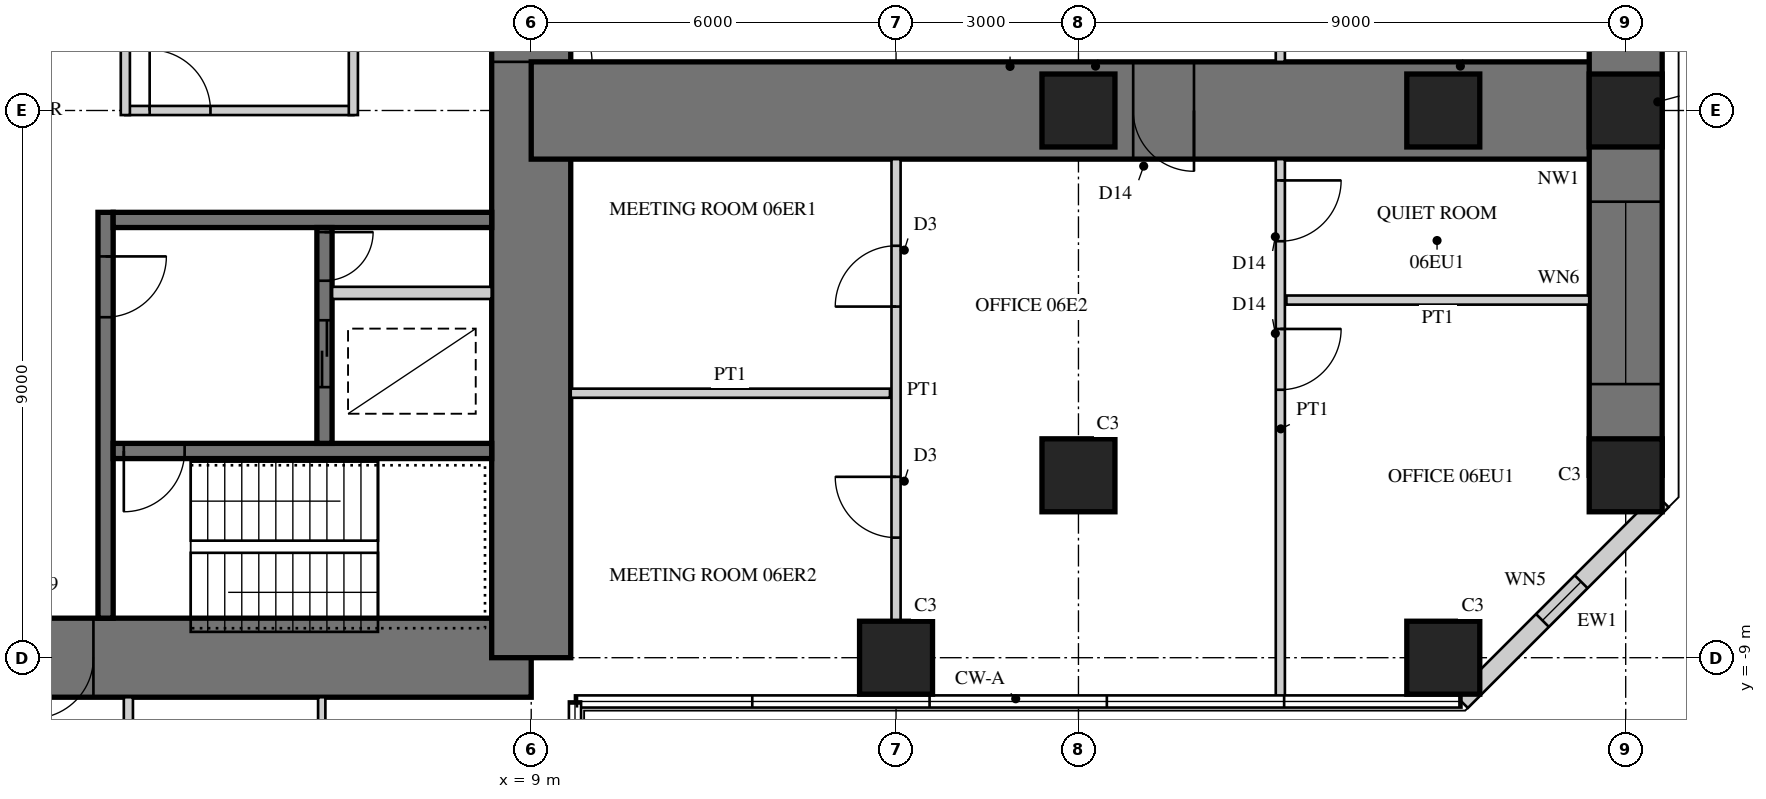
"""IFC4 building model, lengths in metres.
Left out: names, types, materials, properties, quantities, classifications, styles, units other than length and angle.
Written with IfcOpenShell. Run it as: python <this file> out.ifc"""

import sys

from ifc_helpers import new_model, si_unit, direction, frame, frame_2d, origin, origin_2d, place, context, subcontext, project, spatial, rectangle, hollow_rectangle, extrude, element, fill, save


model = new_model("IFC4")
c1 = context("Model", 3, precision=1e-05, world=origin(), true_north=direction((0.0, 1.0)))
c2 = subcontext(c1, "Body", "Model", "MODEL_VIEW")
j1 = project(units=[si_unit("LENGTHUNIT", "METRE"), si_unit("PLANEANGLEUNIT", "RADIAN")], contexts=[c1])
p1 = place(None, origin())
s1 = spatial("IfcSite", under=j1, at=p1, CompositionType="ELEMENT")
p2 = place(p1, origin())
s2 = spatial("IfcBuilding", under=s1, at=p2, CompositionType="ELEMENT")
p3 = place(p2, frame((0.0, 0.0, 27.5)))
s3 = spatial("IfcBuildingStorey", under=s2, at=p3, CompositionType="ELEMENT", Elevation=27.5)
p4 = place(p3, frame((-9.0, -9.0, 0.0), z_axis=(0.0, 0.0, 1.0), x_axis=(1.0, 0.0, 0.0)))
e1 = element("IfcWall", 1, at=p4, inside=s3, PredefinedType="SHEAR", context=c2, shape_type="SweptSolid", body=[
    extrude(rectangle(XDim=18.0, YDim=1.3, at=frame_2d((9.0, 0.0))), origin(), (0.0, 0.0, 1.0), 4.0),
])
p5 = place(p4, frame((9.8, 0.0, 0.0)))
e2 = element("IfcOpeningElement", 2, at=p5, cuts=e1, PredefinedType="OPENING", context=c2, shape_type="SweptSolid", body=[
    extrude(rectangle(XDim=1.0, YDim=2.4, at=frame_2d((0.5, 1.2))), frame((0.0, 0.66, 0.0), z_axis=(0.0, -1.0, 0.0), x_axis=(1.0, 0.0, 0.0)), (0.0, 0.0, 1.0), 1.32),
])
p6 = place(p3, frame((9.0, -9.0, 0.0), z_axis=(0.0, 0.0, 1.0), x_axis=(0.0, 1.0, 0.0)))
e3 = element("IfcWall", 3, at=p6, inside=s3, PredefinedType="SHEAR", context=c2, shape_type="SweptSolid", body=[
    extrude(rectangle(XDim=18.0, YDim=1.3, at=frame_2d((9.0, 0.0))), origin(), (0.0, 0.0, 1.0), 4.0),
])
p7 = place(p6, frame((9.8, 0.0, 0.0)))
e4 = element("IfcOpeningElement", 4, at=p7, cuts=e3, PredefinedType="OPENING", context=c2, shape_type="SweptSolid", body=[
    extrude(rectangle(XDim=1.0, YDim=2.4, at=frame_2d((0.5, 1.2))), frame((0.0, 0.66, 0.0), z_axis=(0.0, -1.0, 0.0), x_axis=(1.0, 0.0, 0.0)), (0.0, 0.0, 1.0), 1.32),
])
p8 = place(p3, frame((2.0, -1.675, 0.0), z_axis=(0.0, 0.0, 1.0), x_axis=(0.0, -1.0, 0.0)))
e5 = element("IfcWall", 5, at=p8, inside=s3, PredefinedType="SHEAR", context=c2, shape_type="SweptSolid", body=[
    extrude(rectangle(XDim=6.675, YDim=0.25, at=frame_2d((3.337, 0.0))), origin(), (0.0, 0.0, 1.0), 4.0),
])
p9 = place(p8, frame((0.725, 0.0, 0.0)))
e6 = element("IfcOpeningElement", 6, at=p9, cuts=e5, PredefinedType="OPENING", context=c2, shape_type="SweptSolid", body=[
    extrude(rectangle(XDim=1.0, YDim=2.1, at=frame_2d((0.5, 1.05))), frame((0.0, 0.135, 0.0), z_axis=(0.0, -1.0, 0.0), x_axis=(1.0, 0.0, 0.0)), (0.0, 0.0, 1.0), 0.27),
])
p10 = place(p3, frame((2.125, -1.8, 0.0), z_axis=(0.0, 0.0, 1.0), x_axis=(1.0, 0.0, 0.0)))
e7 = element("IfcWall", 7, at=p10, inside=s3, PredefinedType="SHEAR", context=c2, shape_type="SweptSolid", body=[
    extrude(rectangle(XDim=6.225, YDim=0.25, at=frame_2d((3.113, 0.0))), origin(), (0.0, 0.0, 1.0), 4.0),
])
p11 = place(p3, frame((2.125, -5.6, 0.0), z_axis=(0.0, 0.0, 1.0), x_axis=(1.0, 0.0, 0.0)))
e8 = element("IfcWall", 8, at=p11, inside=s3, PredefinedType="SHEAR", context=c2, shape_type="SweptSolid", body=[
    extrude(rectangle(XDim=6.225, YDim=0.25, at=frame_2d((3.113, 0.0))), origin(), (0.0, 0.0, 1.0), 4.0),
])
p12 = place(p11, frame((0.175, 0.0, 0.0)))
e9 = element("IfcOpeningElement", 9, at=p12, cuts=e8, PredefinedType="OPENING", context=c2, shape_type="SweptSolid", body=[
    extrude(rectangle(XDim=1.0, YDim=2.1, at=frame_2d((0.5, 1.05))), frame((0.0, 0.135, 0.0), z_axis=(0.0, -1.0, 0.0), x_axis=(1.0, 0.0, 0.0)), (0.0, 0.0, 1.0), 0.27),
])
p13 = place(p3, frame((5.6, -1.925, 0.0), z_axis=(0.0, 0.0, 1.0), x_axis=(0.0, -1.0, 0.0)))
e10 = element("IfcWall", 10, at=p13, inside=s3, PredefinedType="SHEAR", context=c2, shape_type="SweptSolid", body=[
    extrude(rectangle(XDim=3.55, YDim=0.25, at=frame_2d((1.775, 0.0))), origin(), (0.0, 0.0, 1.0), 4.0),
])
p14 = place(p13, frame((1.525, 0.0, 0.0)))
e11 = element("IfcOpeningElement", 11, at=p14, cuts=e10, PredefinedType="OPENING", context=c2, shape_type="SweptSolid", body=[
    extrude(rectangle(XDim=1.1, YDim=2.2, at=frame_2d((0.55, 1.1))), frame((0.0, 0.135, 0.0), z_axis=(0.0, -1.0, 0.0), x_axis=(1.0, 0.0, 0.0)), (0.0, 0.0, 1.0), 0.27),
])
p15 = place(p13, frame((0.075, 0.0, 0.0)))
e12 = element("IfcOpeningElement", 12, at=p15, cuts=e10, PredefinedType="OPENING", context=c2, shape_type="SweptSolid", body=[
    extrude(rectangle(XDim=0.8, YDim=2.1, at=frame_2d((0.4, 1.05))), frame((0.0, 0.135, 0.0), z_axis=(0.0, -1.0, 0.0), x_axis=(1.0, 0.0, 0.0)), (0.0, 0.0, 1.0), 0.27),
])
p16 = place(p3, frame((5.725, -3.0, 0.0), z_axis=(0.0, 0.0, 1.0), x_axis=(1.0, 0.0, 0.0)))
e13 = element("IfcWall", 13, at=p16, inside=s3, PredefinedType="PARTITIONING", context=c2, shape_type="SweptSolid", body=[
    extrude(rectangle(XDim=2.625, YDim=0.2, at=frame_2d((1.312, 0.0))), origin(), (0.0, 0.0, 1.0), 4.0),
])
p17 = place(p3, frame((9.0, 0.0, 0.0), z_axis=(0.0, 0.0, 1.0), x_axis=(1.0, 0.0, 0.0)))
e14 = element("IfcWall", 14, at=p17, inside=s3, PredefinedType="SHEAR", context=c2, shape_type="SweptSolid", body=[
    extrude(rectangle(XDim=18.0, YDim=1.6, at=frame_2d((9.0, 0.0))), origin(), (0.0, 0.0, 1.0), 4.0),
])
p18 = place(p17, frame((9.9, 0.0, 0.0)))
e15 = element("IfcOpeningElement", 15, at=p18, cuts=e14, PredefinedType="OPENING", context=c2, shape_type="SweptSolid", body=[
    extrude(rectangle(XDim=1.0, YDim=2.2, at=frame_2d((0.5, 1.1))), frame((0.0, 0.81, 0.0), z_axis=(0.0, -1.0, 0.0), x_axis=(1.0, 0.0, 0.0)), (0.0, 0.0, 1.0), 1.62),
])
p19 = place(p3, frame((27.0, -6.0, 0.0), z_axis=(0.0, 0.0, 1.0), x_axis=(0.0, 1.0, 0.0)))
e16 = element("IfcWall", 16, at=p19, inside=s3, PredefinedType="SHEAR", context=c2, shape_type="SweptSolid", body=[
    extrude(rectangle(XDim=12.0, YDim=1.2, at=frame_2d((6.0, 0.0))), origin(), (0.0, 0.0, 1.0), 4.0),
])
p20 = place(p19, frame((1.5, 0.0, 0.6)))
e17 = element("IfcOpeningElement", 17, at=p20, cuts=e16, PredefinedType="OPENING", context=c2, shape_type="SweptSolid", body=[
    extrude(rectangle(XDim=3.0, YDim=2.4, at=frame_2d((1.5, 1.2))), frame((0.0, 0.61, 0.0), z_axis=(0.0, -1.0, 0.0), x_axis=(1.0, 0.0, 0.0)), (0.0, 0.0, 1.0), 1.22),
])
p21 = place(p19, frame((7.5, 0.0, 0.6)))
e18 = element("IfcOpeningElement", 18, at=p21, cuts=e16, PredefinedType="OPENING", context=c2, shape_type="SweptSolid", body=[
    extrude(rectangle(XDim=3.0, YDim=2.4, at=frame_2d((1.5, 1.2))), frame((0.0, 0.61, 0.0), z_axis=(0.0, -1.0, 0.0), x_axis=(1.0, 0.0, 0.0)), (0.0, 0.0, 1.0), 1.22),
])
for number, where, z_axis, x_axis in (
    (19, (15.0, -9.0, 0.0), (0.0, 0.0, 1.0), (1.0, 0.0, 0.0)),
    (20, (24.0, -9.0, 0.0), (0.0, 0.0, 1.0), (1.0, 0.0, 0.0)),
    (21, (27.0, -6.0, 0.0), (0.0, 0.0, 1.0), (1.0, 0.0, 0.0)),
    (22, (27.0, 0.0, 0.0), (0.0, 0.0, 1.0), (1.0, 0.0, 0.0)),
    (23, (18.0, -6.0, 0.0), (0.0, 0.0, 1.0), (1.0, 0.0, 0.0)),
    (24, (18.0, 0.0, 0.0), (0.0, 0.0, 1.0), (1.0, 0.0, 0.0)),
    (25, (24.0, 0.0, 0.0), (0.0, 0.0, 1.0), (1.0, 0.0, 0.0)),
):
    element("IfcColumn", number, at=place(p3, frame(where, z_axis=z_axis, x_axis=x_axis)), inside=s3, PredefinedType="COLUMN", context=c2, shape_type="SweptSolid", body=[
        extrude(rectangle(XDim=1.2, YDim=1.2, at=origin_2d()), origin(), (0.0, 0.0, 1.0), 4.0),
    ])
p22 = place(p3, frame((24.298, -9.72, 0.0), z_axis=(0.0, 0.0, 1.0), x_axis=(0.707106781187, 0.707106781187, 0.0)))
e26 = element("IfcWall", 26, at=p22, inside=s3, PredefinedType="SOLIDWALL", context=c2, shape_type="SweptSolid", body=[
    extrude(rectangle(XDim=4.669, YDim=0.3, at=frame_2d((2.335, 0.0))), origin(), (0.0, 0.0, 1.0), 3.8),
])
p23 = place(p22, frame((1.885, 0.0, 0.3)))
e27 = element("IfcOpeningElement", 27, at=p23, cuts=e26, PredefinedType="OPENING", context=c2, shape_type="SweptSolid", body=[
    extrude(rectangle(XDim=0.9, YDim=2.4, at=frame_2d((0.45, 1.2))), frame((0.0, 0.16, 0.0), z_axis=(0.0, -1.0, 0.0), x_axis=(1.0, 0.0, 0.0)), (0.0, 0.0, 1.0), 0.32),
])
p24 = place(p3, frame((2.325, 0.0, 0.0), z_axis=(0.0, 0.0, 1.0), x_axis=(1.0, 0.0, 0.0)))
e28 = element("IfcWall", 28, at=p24, inside=s3, PredefinedType="PARTITIONING", context=c2, shape_type="SweptSolid", body=[
    extrude(rectangle(XDim=3.75, YDim=0.15, at=frame_2d((1.875, 0.0))), origin(), (0.0, 0.0, 1.0), 3.8),
])
p25 = place(p24, frame((0.4, 0.0, 0.0)))
e29 = element("IfcOpeningElement", 29, at=p25, cuts=e28, PredefinedType="OPENING", context=c2, shape_type="SweptSolid", body=[
    extrude(rectangle(XDim=1.0, YDim=2.1, at=frame_2d((0.5, 1.05))), frame((0.0, 0.085, 0.0), z_axis=(0.0, -1.0, 0.0), x_axis=(1.0, 0.0, 0.0)), (0.0, 0.0, 1.0), 0.17),
])
for number, where, z_axis, x_axis in (
    (30, (2.325, 1.875, 0.0), (0.0, 0.0, 1.0), (0.0, -1.0, 0.0)),
    (31, (6.075, -0.075, 0.0), (0.0, 0.0, 1.0), (0.0, 1.0, 0.0)),
):
    element("IfcWall", number, at=place(p3, frame(where, z_axis=z_axis, x_axis=x_axis)), inside=s3, PredefinedType="PARTITIONING", context=c2, shape_type="SweptSolid", body=[
        extrude(rectangle(XDim=1.95, YDim=0.15, at=frame_2d((0.975, 0.0))), origin(), (0.0, 0.0, 1.0), 3.8),
    ])
p26 = place(p3, frame((15.0, -8.4, 0.0), z_axis=(0.0, 0.0, 1.0), x_axis=(0.0, 1.0, 0.0)))
e32 = element("IfcWall", 32, at=p26, inside=s3, PredefinedType="PARTITIONING", context=c2, shape_type="SweptSolid", body=[
    extrude(rectangle(XDim=7.6, YDim=0.15, at=frame_2d((3.8, 0.0))), origin(), (0.0, 0.0, 1.0), 2.95),
])
p27 = place(p26, frame((1.375, 0.0, 0.0)))
e33 = element("IfcOpeningElement", 33, at=p27, cuts=e32, PredefinedType="OPENING", context=c2, shape_type="SweptSolid", body=[
    extrude(rectangle(XDim=1.0, YDim=2.1, at=frame_2d((0.5, 1.05))), frame((0.0, 0.085, 0.0), z_axis=(0.0, -1.0, 0.0), x_axis=(1.0, 0.0, 0.0)), (0.0, 0.0, 1.0), 0.17),
])
p28 = place(p26, frame((5.175, 0.0, 0.0)))
e34 = element("IfcOpeningElement", 34, at=p28, cuts=e32, PredefinedType="OPENING", context=c2, shape_type="SweptSolid", body=[
    extrude(rectangle(XDim=1.0, YDim=2.1, at=frame_2d((0.5, 1.05))), frame((0.0, 0.085, 0.0), z_axis=(0.0, -1.0, 0.0), x_axis=(1.0, 0.0, 0.0)), (0.0, 0.0, 1.0), 0.17),
])
p29 = place(p3, frame((9.65, -4.65, 0.0), z_axis=(0.0, 0.0, 1.0), x_axis=(1.0, 0.0, 0.0)))
e35 = element("IfcWall", 35, at=p29, inside=s3, PredefinedType="PARTITIONING", context=c2, shape_type="SweptSolid", body=[
    extrude(rectangle(XDim=5.25, YDim=0.15, at=frame_2d((2.625, 0.0))), origin(), (0.0, 0.0, 1.0), 3.8),
])
p30 = place(p3, frame((21.32, 0.8, 0.0), z_axis=(0.0, 0.0, 1.0), x_axis=(0.0, 1.0, 0.0)))
e36 = element("IfcWall", 36, at=p30, inside=s3, PredefinedType="PARTITIONING", context=c2, shape_type="SweptSolid", body=[
    extrude(rectangle(XDim=8.88, YDim=0.15, at=frame_2d((4.44, 0.0))), origin(), (0.0, 0.0, 1.0), 3.8),
])
p31 = place(p30, frame((0.45, 0.0, 0.0)))
e37 = element("IfcOpeningElement", 37, at=p31, cuts=e36, PredefinedType="OPENING", context=c2, shape_type="SweptSolid", body=[
    extrude(rectangle(XDim=1.0, YDim=2.2, at=frame_2d((0.5, 1.1))), frame((0.0, 0.085, 0.0), z_axis=(0.0, -1.0, 0.0), x_axis=(1.0, 0.0, 0.0)), (0.0, 0.0, 1.0), 0.17),
])
p32 = place(p3, frame((21.42, -3.118, 0.0), z_axis=(0.0, 0.0, 1.0), x_axis=(1.0, 0.0, 0.0)))
e38 = element("IfcWall", 38, at=p32, inside=s3, PredefinedType="PARTITIONING", context=c2, shape_type="SweptSolid", body=[
    extrude(rectangle(XDim=4.98, YDim=0.15, at=frame_2d((2.49, 0.0))), origin(), (0.0, 0.0, 1.0), 3.8),
])
p33 = place(p3, frame((21.32, -9.68, 0.0), z_axis=(0.0, 0.0, 1.0), x_axis=(0.0, 1.0, 0.0)))
e39 = element("IfcWall", 39, at=p33, inside=s3, PredefinedType="PARTITIONING", context=c2, shape_type="SweptSolid", body=[
    extrude(rectangle(XDim=8.88, YDim=0.15, at=frame_2d((4.44, 0.0))), origin(), (0.0, 0.0, 1.0), 3.8),
])
p34 = place(p33, frame((5.087, 0.0, 0.0)))
e40 = element("IfcOpeningElement", 40, at=p34, cuts=e39, PredefinedType="OPENING", context=c2, shape_type="SweptSolid", body=[
    extrude(rectangle(XDim=1.0, YDim=2.2, at=frame_2d((0.5, 1.1))), frame((0.0, 0.085, 0.0), z_axis=(0.0, -1.0, 0.0), x_axis=(1.0, 0.0, 0.0)), (0.0, 0.0, 1.0), 0.17),
])
p35 = place(p33, frame((7.53, 0.0, 0.0)))
e41 = element("IfcOpeningElement", 41, at=p35, cuts=e39, PredefinedType="OPENING", context=c2, shape_type="SweptSolid", body=[
    extrude(rectangle(XDim=1.0, YDim=2.2, at=frame_2d((0.5, 1.1))), frame((0.0, 0.085, 0.0), z_axis=(0.0, -1.0, 0.0), x_axis=(1.0, 0.0, 0.0)), (0.0, 0.0, 1.0), 0.17),
])
p36 = place(p3, frame((2.375, -9.65, 0.0), z_axis=(0.0, 0.0, 1.0), x_axis=(0.0, -1.0, 0.0)))
e42 = element("IfcWall", 42, at=p36, inside=s3, PredefinedType="PARTITIONING", context=c2, shape_type="SweptSolid", body=[
    extrude(rectangle(XDim=5.35, YDim=0.15, at=frame_2d((2.675, 0.0))), origin(), (0.0, 0.0, 1.0), 3.8),
])
p37 = place(p3, frame((5.555, -9.65, 0.0), z_axis=(0.0, 0.0, 1.0), x_axis=(0.0, -1.0, 0.0)))
e43 = element("IfcWall", 43, at=p37, inside=s3, PredefinedType="PLUMBINGWALL", context=c2, shape_type="SweptSolid", body=[
    extrude(rectangle(XDim=5.25, YDim=0.12, at=frame_2d((2.625, 0.0))), origin(), (0.0, 0.0, 1.0), 3.8),
])
p38 = place(p23, origin())
e44 = element("IfcWindow", 44, at=p38, inside=s3, PartitioningType="SINGLE_PANEL", PredefinedType="WINDOW", context=c2, shape_type="SweptSolid", body=[
    extrude(hollow_rectangle(XDim=0.9, YDim=2.4, WallThickness=0.06, at=frame_2d((0.45, 1.2))), frame((0.0, 0.03, 0.0), z_axis=(0.0, -1.0, 0.0), x_axis=(1.0, 0.0, 0.0)), (0.0, 0.0, 1.0), 0.06),
    extrude(rectangle(XDim=0.779, YDim=2.279, at=frame_2d((0.45, 1.2))), frame((0.0, 0.03, 0.0), z_axis=(0.0, -1.0, 0.0), x_axis=(1.0, 0.0, 0.0)), (0.0, 0.0, 1.0), 0.06),
])
fill(e27, e44)
p39 = place(p20, origin())
e45 = element("IfcWindow", 45, at=p39, inside=s3, PartitioningType="SINGLE_PANEL", PredefinedType="WINDOW", context=c2, shape_type="SweptSolid", body=[
    extrude(hollow_rectangle(XDim=3.0, YDim=2.4, WallThickness=0.06, at=frame_2d((1.5, 1.2))), frame((0.0, 0.03, 0.0), z_axis=(0.0, -1.0, 0.0), x_axis=(1.0, 0.0, 0.0)), (0.0, 0.0, 1.0), 0.06),
    extrude(rectangle(XDim=2.879, YDim=2.279, at=frame_2d((1.5, 1.2))), frame((0.0, 0.03, 0.0), z_axis=(0.0, -1.0, 0.0), x_axis=(1.0, 0.0, 0.0)), (0.0, 0.0, 1.0), 0.06),
])
fill(e17, e45)
p40 = place(p25, origin())
e46 = element("IfcDoor", 46, at=p40, inside=s3, OperationType="SINGLE_SWING_LEFT", PredefinedType="DOOR", context=c2, shape_type="SweptSolid", body=[
    extrude(rectangle(XDim=1.0, YDim=2.1, at=frame_2d((0.5, 1.05))), frame((0.0, 0.025, 0.0), z_axis=(0.0, -1.0, 0.0), x_axis=(1.0, 0.0, 0.0)), (0.0, 0.0, 1.0), 0.05),
])
fill(e29, e46)
p41 = place(p27, origin())
e47 = element("IfcDoor", 47, at=p41, inside=s3, OperationType="SINGLE_SWING_RIGHT", PredefinedType="DOOR", context=c2, shape_type="SweptSolid", body=[
    extrude(rectangle(XDim=1.0, YDim=2.1, at=frame_2d((0.5, 1.05))), frame((0.0, 0.025, 0.0), z_axis=(0.0, -1.0, 0.0), x_axis=(1.0, 0.0, 0.0)), (0.0, 0.0, 1.0), 0.05),
])
fill(e33, e47)
p42 = place(p28, origin())
e48 = element("IfcDoor", 48, at=p42, inside=s3, OperationType="SINGLE_SWING_LEFT", PredefinedType="DOOR", context=c2, shape_type="SweptSolid", body=[
    extrude(rectangle(XDim=1.0, YDim=2.1, at=frame_2d((0.5, 1.05))), frame((0.0, 0.025, 0.0), z_axis=(0.0, -1.0, 0.0), x_axis=(1.0, 0.0, 0.0)), (0.0, 0.0, 1.0), 0.05),
])
fill(e34, e48)
p43 = place(p34, frame((1.0, 0.0, 0.0), z_axis=(0.0, 0.0, 1.0), x_axis=(-1.0, 0.0, 0.0)))
e49 = element("IfcDoor", 49, at=p43, inside=s3, OperationType="SINGLE_SWING_LEFT", PredefinedType="DOOR", context=c2, shape_type="SweptSolid", body=[
    extrude(rectangle(XDim=1.0, YDim=2.2, at=frame_2d((0.5, 1.1))), frame((0.0, 0.025, 0.0), z_axis=(0.0, -1.0, 0.0), x_axis=(1.0, 0.0, 0.0)), (0.0, 0.0, 1.0), 0.05),
])
fill(e40, e49)
p44 = place(p35, frame((1.0, 0.0, 0.0), z_axis=(0.0, 0.0, 1.0), x_axis=(-1.0, 0.0, 0.0)))
e50 = element("IfcDoor", 50, at=p44, inside=s3, OperationType="SINGLE_SWING_LEFT", PredefinedType="DOOR", context=c2, shape_type="SweptSolid", body=[
    extrude(rectangle(XDim=1.0, YDim=2.2, at=frame_2d((0.5, 1.1))), frame((0.0, 0.025, 0.0), z_axis=(0.0, -1.0, 0.0), x_axis=(1.0, 0.0, 0.0)), (0.0, 0.0, 1.0), 0.05),
])
fill(e41, e50)
p45 = place(p18, frame((1.0, 0.0, 0.0), z_axis=(0.0, 0.0, 1.0), x_axis=(-1.0, 0.0, 0.0)))
e51 = element("IfcDoor", 51, at=p45, inside=s3, OperationType="SINGLE_SWING_LEFT", PredefinedType="DOOR", context=c2, shape_type="SweptSolid", body=[
    extrude(rectangle(XDim=1.0, YDim=2.2, at=frame_2d((0.5, 1.1))), frame((0.0, 0.025, 0.0), z_axis=(0.0, -1.0, 0.0), x_axis=(1.0, 0.0, 0.0)), (0.0, 0.0, 1.0), 0.05),
])
fill(e15, e51)
p46 = place(p5, frame((1.0, 0.0, 0.0), z_axis=(0.0, 0.0, 1.0), x_axis=(-1.0, 0.0, 0.0)))
e52 = element("IfcDoor", 52, at=p46, inside=s3, OperationType="SINGLE_SWING_RIGHT", PredefinedType="DOOR", context=c2, shape_type="SweptSolid", body=[
    extrude(rectangle(XDim=1.0, YDim=2.4, at=frame_2d((0.5, 1.2))), frame((0.0, -0.005, 0.0), z_axis=(0.0, -1.0, 0.0), x_axis=(1.0, 0.0, 0.0)), (0.0, 0.0, 1.0), 0.05),
])
fill(e2, e52)
p47 = place(p7, frame((1.0, 0.0, 0.0), z_axis=(0.0, 0.0, 1.0), x_axis=(-1.0, 0.0, 0.0)))
e53 = element("IfcDoor", 53, at=p47, inside=s3, OperationType="SINGLE_SWING_RIGHT", PredefinedType="DOOR", context=c2, shape_type="SweptSolid", body=[
    extrude(rectangle(XDim=1.0, YDim=2.4, at=frame_2d((0.5, 1.2))), frame((0.0, -0.005, 0.0), z_axis=(0.0, -1.0, 0.0), x_axis=(1.0, 0.0, 0.0)), (0.0, 0.0, 1.0), 0.05),
])
fill(e4, e53)
p48 = place(p9, origin())
e54 = element("IfcDoor", 54, at=p48, inside=s3, OperationType="SINGLE_SWING_LEFT", PredefinedType="DOOR", context=c2, shape_type="SweptSolid", body=[
    extrude(rectangle(XDim=1.0, YDim=2.1, at=frame_2d((0.5, 1.05))), frame((0.0, 0.025, 0.0), z_axis=(0.0, -1.0, 0.0), x_axis=(1.0, 0.0, 0.0)), (0.0, 0.0, 1.0), 0.05),
])
fill(e6, e54)
p49 = place(p12, frame((1.0, 0.0, 0.0), z_axis=(0.0, 0.0, 1.0), x_axis=(-1.0, 0.0, 0.0)))
e55 = element("IfcDoor", 55, at=p49, inside=s3, OperationType="SINGLE_SWING_RIGHT", PredefinedType="DOOR", context=c2, shape_type="SweptSolid", body=[
    extrude(rectangle(XDim=1.0, YDim=2.1, at=frame_2d((0.5, 1.05))), frame((0.0, 0.025, 0.0), z_axis=(0.0, -1.0, 0.0), x_axis=(1.0, 0.0, 0.0)), (0.0, 0.0, 1.0), 0.05),
])
fill(e9, e55)
p50 = place(p14, origin())
e56 = element("IfcDoor", 56, at=p50, inside=s3, OperationType="DOUBLE_DOOR_SLIDING", PredefinedType="DOOR", context=c2, shape_type="SweptSolid", body=[
    extrude(rectangle(XDim=1.1, YDim=2.2, at=frame_2d((0.55, 1.1))), frame((0.0, 0.025, 0.0), z_axis=(0.0, -1.0, 0.0), x_axis=(1.0, 0.0, 0.0)), (0.0, 0.0, 1.0), 0.05),
])
fill(e11, e56)
p51 = place(p15, origin())
e57 = element("IfcDoor", 57, at=p51, inside=s3, OperationType="SINGLE_SWING_LEFT", PredefinedType="DOOR", context=c2, shape_type="SweptSolid", body=[
    extrude(rectangle(XDim=0.8, YDim=2.1, at=frame_2d((0.4, 1.05))), frame((0.0, 0.025, 0.0), z_axis=(0.0, -1.0, 0.0), x_axis=(1.0, 0.0, 0.0)), (0.0, 0.0, 1.0), 0.05),
])
fill(e12, e57)
save(model, sys.argv[1])
